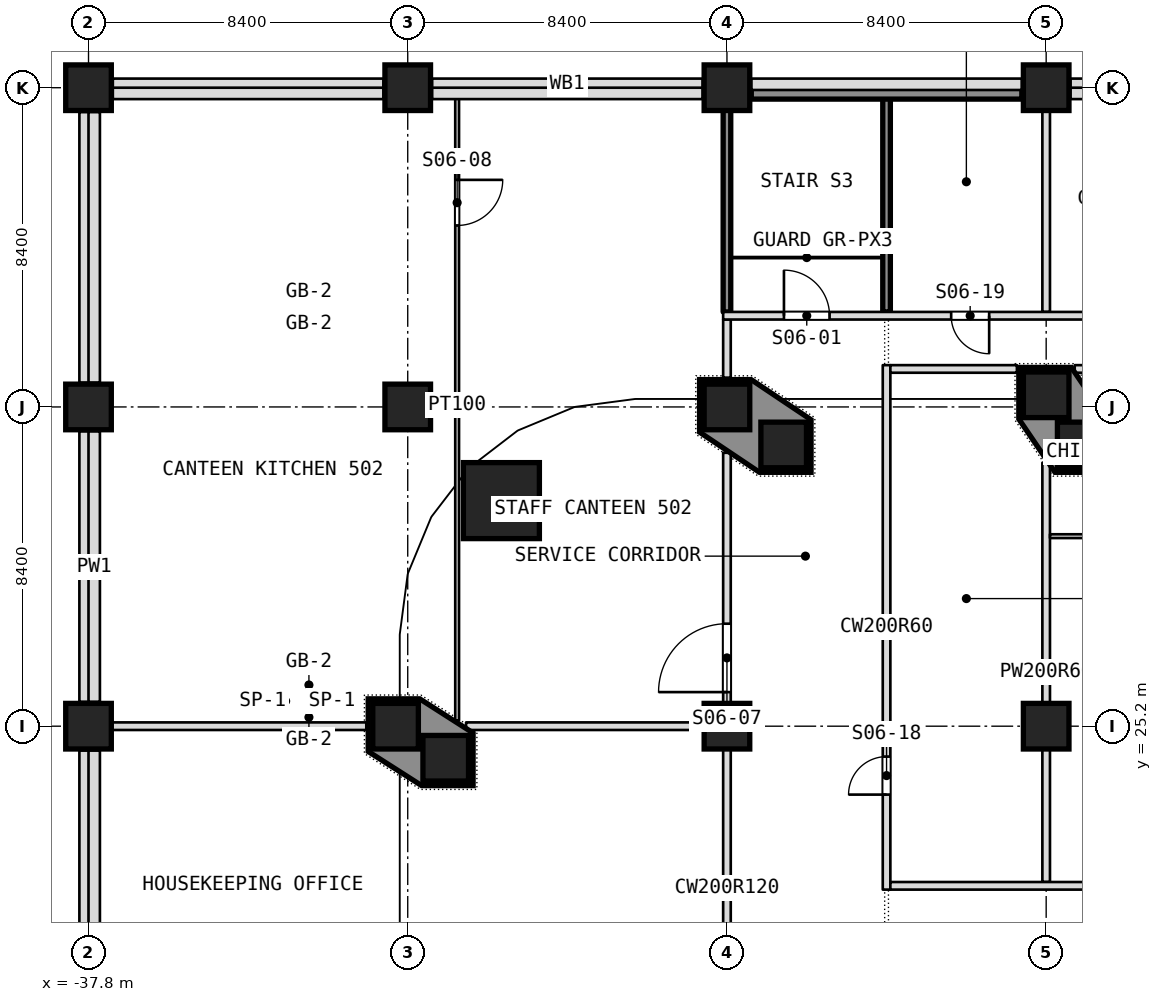
"""IFC4 building model, lengths in metres.
Left out: names, types, materials, properties, quantities, classifications, styles, units other than length and angle.
Written with IfcOpenShell. Run it as: python <this file> out.ifc"""

import sys

from ifc_helpers import new_model, si_unit, direction, frame, frame_2d, origin, origin_2d, place, context, subcontext, project, spatial, polyline, rectangle, outline, extrude, element, fill, save


model = new_model("IFC4")
c1 = context("Model", 3, precision=1e-05, world=origin(), true_north=direction((0.0, 1.0)))
c2 = subcontext(c1, "Body", "Model", "MODEL_VIEW")
j1 = project(units=[si_unit("LENGTHUNIT", "METRE"), si_unit("PLANEANGLEUNIT", "RADIAN")], contexts=[c1])
p1 = place(None, origin())
s1 = spatial("IfcSite", under=j1, at=p1, CompositionType="ELEMENT")
p2 = place(p1, origin())
s2 = spatial("IfcBuilding", under=s1, at=p2, CompositionType="ELEMENT")
p3 = place(p2, frame((0.0, 0.0, 31.0)))
s3 = spatial("IfcBuildingStorey", under=s2, at=p3, CompositionType="ELEMENT", Elevation=31.0)
for number, where, z_axis, x_axis in (
    (1, (-37.8, 25.2, 0.0), (0.0, 0.0, 1.0), (1.0, 0.0, 0.0)),
    (2, (-29.72, 25.2, 0.0), (0.0, 0.0, 1.0), (1.0, 0.0, 0.0)),
    (3, (-21.0, 25.2, 0.0), (0.0, 0.0, 1.0), (1.0, 0.0, 0.0)),
    (4, (-12.6, 25.2, 0.0), (0.0, 0.0, 1.0), (1.0, 0.0, 0.0)),
    (5, (-37.8, 33.6, 0.0), (0.0, 0.0, 1.0), (1.0, 0.0, 0.0)),
    (6, (-29.4, 33.6, 0.0), (0.0, 0.0, 1.0), (1.0, 0.0, 0.0)),
    (7, (-21.0, 33.6, 0.0), (0.0, 0.0, 1.0), (1.0, 0.0, 0.0)),
    (8, (-12.6, 33.92, 0.0), (0.0, 0.0, 1.0), (1.0, 0.0, 0.0)),
    (9, (-37.8, 42.0, 0.0), (0.0, 0.0, 1.0), (1.0, 0.0, 0.0)),
    (10, (-29.4, 42.0, 0.0), (0.0, 0.0, 1.0), (1.0, 0.0, 0.0)),
    (11, (-21.0, 42.0, 0.0), (0.0, 0.0, 1.0), (1.0, 0.0, 0.0)),
    (12, (-12.6, 42.0, 0.0), (0.0, 0.0, 1.0), (1.0, 0.0, 0.0)),
):
    element("IfcColumn", number, at=place(p3, frame(where, z_axis=z_axis, x_axis=x_axis)), inside=s3, PredefinedType="COLUMN", context=c2, shape_type="SweptSolid", body=[
        extrude(rectangle(XDim=1.2, YDim=1.2, at=origin_2d()), origin(), (0.0, 0.0, 1.0), 5.5),
    ])
p4 = place(p3, frame((-26.936, 31.135, 0.0), z_axis=(0.0, 0.0, 1.0), x_axis=(1.0, 0.0, 0.0)))
e13 = element("IfcColumn", 13, at=p4, inside=s3, PredefinedType="COLUMN", context=c2, shape_type="SweptSolid", body=[
    extrude(rectangle(XDim=2.0, YDim=2.0, at=origin_2d()), origin(), (0.0, 0.0, 1.0), 5.5),
])
for number, where, z_axis, x_axis in (
    (14, (-28.4, 24.356, 0.0), (0.0, 0.0, 1.0), (1.0, 0.0, 0.0)),
    (15, (-19.507, 32.6, 0.0), (0.0, 0.0, 1.0), (1.0, 0.0, 0.0)),
    (16, (-11.704, 32.6, 0.0), (0.0, 0.0, 1.0), (1.0, 0.0, 0.0)),
):
    element("IfcColumn", number, at=place(p3, frame(where, z_axis=z_axis, x_axis=x_axis)), inside=s3, PredefinedType="COLUMN", context=c2, shape_type="SweptSolid", body=[
        extrude(rectangle(XDim=1.2, YDim=1.2, at=origin_2d()), origin(), (0.0, 0.0, 1.0), 5.5),
    ])
p5 = place(p3, frame((-12.6, 21.1, 0.0), z_axis=(0.0, 0.0, 1.0), x_axis=(0.0, 1.0, 0.0)))
e17 = element("IfcWall", 17, at=p5, inside=s3, PredefinedType="PARTITIONING", context=c2, shape_type="SweptSolid", body=[
    extrude(rectangle(XDim=11.033, YDim=0.2, at=frame_2d((5.517, 0.0))), origin(), (0.0, 0.0, 1.0), 4.95),
])
p6 = place(p3, frame((-12.6, 36.1, 0.0), z_axis=(0.0, 0.0, 1.0), x_axis=(0.0, 1.0, 0.0)))
e18 = element("IfcWall", 18, at=p6, inside=s3, PredefinedType="PARTITIONING", context=c2, shape_type="SweptSolid", body=[
    extrude(rectangle(XDim=6.2, YDim=0.2, at=frame_2d((3.1, 0.0))), origin(), (0.0, 0.0, 1.0), 5.35),
])
p7 = place(p3, frame((-16.8, 20.9, 0.0), z_axis=(0.0, 0.0, 1.0), x_axis=(0.0, 1.0, 0.0)))
e19 = element("IfcWall", 19, at=p7, inside=s3, PredefinedType="PARTITIONING", context=c2, shape_type="SweptSolid", body=[
    extrude(rectangle(XDim=13.8, YDim=0.2, at=frame_2d((6.9, 0.0))), origin(), (0.0, 0.0, 1.0), 4.95),
])
p8 = place(p7, frame((2.5, 0.0, 0.0)))
e20 = element("IfcOpeningElement", 20, at=p8, cuts=e19, PredefinedType="OPENING", context=c2, shape_type="SweptSolid", body=[
    extrude(rectangle(XDim=1.0, YDim=2.1, at=frame_2d((0.5, 1.05))), frame((0.0, 0.1, 0.0), z_axis=(0.0, -1.0, 0.0), x_axis=(1.0, 0.0, 0.0)), (0.0, 0.0, 1.0), 0.2),
])
p9 = place(p3, frame((-16.8, 36.1, 0.0), z_axis=(0.0, 0.0, 1.0), x_axis=(0.0, 1.0, 0.0)))
e21 = element("IfcWall", 21, at=p9, inside=s3, PredefinedType="PARTITIONING", context=c2, shape_type="SweptSolid", body=[
    extrude(rectangle(XDim=5.84, YDim=0.2, at=frame_2d((2.92, 0.0))), origin(), (0.0, 0.0, 1.0), 5.35),
])
p10 = place(p3, frame((-21.0, 9.5, 0.0), z_axis=(0.0, 0.0, 1.0), x_axis=(0.0, 1.0, 0.0)))
e22 = element("IfcWall", 22, at=p10, inside=s3, PredefinedType="PARTITIONING", context=c2, shape_type="SweptSolid", body=[
    extrude(rectangle(XDim=22.894, YDim=0.2, at=frame_2d((11.447, 0.0))), origin(), (0.0, 0.0, 1.0), 4.95),
])
p11 = place(p10, frame((8.2, 0.0, 0.0)))
e23 = element("IfcOpeningElement", 23, at=p11, cuts=e22, PredefinedType="OPENING", context=c2, shape_type="SweptSolid", body=[
    extrude(rectangle(XDim=1.0, YDim=2.1, at=frame_2d((0.5, 1.05))), frame((0.0, 0.1, 0.0), z_axis=(0.0, -1.0, 0.0), x_axis=(1.0, 0.0, 0.0)), (0.0, 0.0, 1.0), 0.2),
])
p12 = place(p10, frame((16.597, 0.0, 0.0)))
e24 = element("IfcOpeningElement", 24, at=p12, cuts=e22, PredefinedType="OPENING", context=c2, shape_type="SweptSolid", body=[
    extrude(rectangle(XDim=1.8, YDim=2.1, at=frame_2d((0.9, 1.05))), frame((0.0, 0.1, 0.0), z_axis=(0.0, -1.0, 0.0), x_axis=(1.0, 0.0, 0.0)), (0.0, 0.0, 1.0), 0.2),
])
p13 = place(p3, frame((-21.0, 34.37, 0.0), z_axis=(0.0, 0.0, 1.0), x_axis=(0.0, 1.0, 0.0)))
e25 = element("IfcWall", 25, at=p13, inside=s3, PredefinedType="PARTITIONING", context=c2, shape_type="SweptSolid", body=[
    extrude(rectangle(XDim=1.53, YDim=0.2, at=frame_2d((0.765, 0.0))), origin(), (0.0, 0.0, 1.0), 5.35),
])
p14 = place(p3, frame((-21.0, 36.1, 0.0), z_axis=(0.0, 0.0, 1.0), x_axis=(0.0, 1.0, 0.0)))
e26 = element("IfcWall", 26, at=p14, inside=s3, PredefinedType="PARTITIONING", context=c2, shape_type="SweptSolid", body=[
    extrude(rectangle(XDim=6.2, YDim=0.2, at=frame_2d((3.1, 0.0))), origin(), (0.0, 0.0, 1.0), 5.35),
])
p15 = place(p3, frame((-16.7, 21.0, 0.0), z_axis=(0.0, 0.0, 1.0), x_axis=(1.0, 0.0, 0.0)))
e27 = element("IfcWall", 27, at=p15, inside=s3, PredefinedType="PARTITIONING", context=c2, shape_type="SweptSolid", body=[
    extrude(rectangle(XDim=21.0, YDim=0.2, at=frame_2d((10.5, 0.0))), origin(), (0.0, 0.0, 1.0), 5.35),
])
p16 = place(p15, frame((11.6, 0.0, 0.0)))
e28 = element("IfcOpeningElement", 28, at=p16, cuts=e27, PredefinedType="OPENING", context=c2, shape_type="SweptSolid", body=[
    extrude(rectangle(XDim=1.8, YDim=2.1, at=frame_2d((0.9, 1.05))), frame((0.0, 0.1, 0.0), z_axis=(0.0, -1.0, 0.0), x_axis=(1.0, 0.0, 0.0)), (0.0, 0.0, 1.0), 0.2),
])
p17 = place(p3, frame((-38.1, 25.2, 0.0), z_axis=(0.0, 0.0, 1.0), x_axis=(1.0, 0.0, 0.0)))
e29 = element("IfcWall", 29, at=p17, inside=s3, PredefinedType="PARTITIONING", context=c2, shape_type="SweptSolid", body=[
    extrude(rectangle(XDim=7.61, YDim=0.2, at=frame_2d((3.805, 0.0))), origin(), (0.0, 0.0, 1.0), 5.35),
])
p18 = place(p3, frame((-27.865, 25.2, 0.0), z_axis=(0.0, 0.0, 1.0), x_axis=(1.0, 0.0, 0.0)))
e30 = element("IfcWall", 30, at=p18, inside=s3, PredefinedType="PARTITIONING", context=c2, shape_type="SweptSolid", body=[
    extrude(rectangle(XDim=6.765, YDim=0.2, at=frame_2d((3.382, 0.0))), origin(), (0.0, 0.0, 1.0), 4.85),
])
p19 = place(p3, frame((-28.1, 25.35, 0.0), z_axis=(0.0, 0.0, 1.0), x_axis=(0.0, 1.0, 0.0)))
e31 = element("IfcWall", 31, at=p19, inside=s3, PredefinedType="PARTITIONING", context=c2, shape_type="SweptSolid", body=[
    extrude(rectangle(XDim=16.59, YDim=0.1, at=frame_2d((8.295, 0.0))), origin(), (0.0, 0.0, 1.0), 4.95),
])
p20 = place(p19, frame((13.025, 0.0, 0.0)))
e32 = element("IfcOpeningElement", 32, at=p20, cuts=e31, PredefinedType="OPENING", context=c2, shape_type="SweptSolid", body=[
    extrude(rectangle(XDim=1.2, YDim=2.1, at=frame_2d((0.6, 1.05))), frame((0.0, 0.05, 0.0), z_axis=(0.0, -1.0, 0.0), x_axis=(1.0, 0.0, 0.0)), (0.0, 0.0, 1.0), 0.1),
])
p21 = place(p3, frame((-12.5, 30.2, 0.0), z_axis=(0.0, 0.0, 1.0), x_axis=(1.0, 0.0, 0.0)))
e33 = element("IfcWall", 33, at=p21, inside=s3, PredefinedType="PARTITIONING", context=c2, shape_type="SweptSolid", body=[
    extrude(rectangle(XDim=16.8, YDim=0.1, at=frame_2d((8.4, 0.0))), origin(), (0.0, 0.0, 1.0), 5.35),
])
p22 = place(p21, frame((7.8, 0.0, 0.0)))
e34 = element("IfcOpeningElement", 34, at=p22, cuts=e33, PredefinedType="OPENING", context=c2, shape_type="SweptSolid", body=[
    extrude(rectangle(XDim=1.0, YDim=2.1, at=frame_2d((0.5, 1.05))), frame((0.0, 0.05, 0.0), z_axis=(0.0, -1.0, 0.0), x_axis=(1.0, 0.0, 0.0)), (0.0, 0.0, 1.0), 0.1),
])
p23 = place(p3, frame((-16.7, 34.6, 0.0), z_axis=(0.0, 0.0, 1.0), x_axis=(1.0, 0.0, 0.0)))
e35 = element("IfcWall", 35, at=p23, inside=s3, PredefinedType="PARTITIONING", context=c2, shape_type="SweptSolid", body=[
    extrude(rectangle(XDim=3.33, YDim=0.2, at=frame_2d((1.665, 0.0))), origin(), (0.0, 0.0, 1.0), 5.35),
])
p24 = place(p3, frame((-11.849, 34.6, 0.0), z_axis=(0.0, 0.0, 1.0), x_axis=(1.0, 0.0, 0.0)))
e36 = element("IfcWall", 36, at=p24, inside=s3, PredefinedType="PARTITIONING", context=c2, shape_type="SweptSolid", body=[
    extrude(rectangle(XDim=6.879, YDim=0.2, at=frame_2d((3.439, 0.0))), origin(), (0.0, 0.0, 1.0), 5.35),
])
p25 = place(p3, frame((-21.1, 36.0, 0.0), z_axis=(0.0, 0.0, 1.0), x_axis=(1.0, 0.0, 0.0)))
e37 = element("IfcWall", 37, at=p25, inside=s3, PredefinedType="PARTITIONING", context=c2, shape_type="SweptSolid", body=[
    extrude(rectangle(XDim=23.3, YDim=0.2, at=frame_2d((11.65, 0.0))), origin(), (0.0, 0.0, 1.0), 5.35),
])
p26 = place(p25, frame((1.6, 0.0, 0.0)))
e38 = element("IfcOpeningElement", 38, at=p26, cuts=e37, PredefinedType="OPENING", context=c2, shape_type="SweptSolid", body=[
    extrude(rectangle(XDim=1.2, YDim=2.1, at=frame_2d((0.6, 1.05))), frame((0.0, 0.1, 0.0), z_axis=(0.0, -1.0, 0.0), x_axis=(1.0, 0.0, 0.0)), (0.0, 0.0, 1.0), 0.2),
])
p27 = place(p25, frame((6.0, 0.0, 0.0)))
e39 = element("IfcOpeningElement", 39, at=p27, cuts=e37, PredefinedType="OPENING", context=c2, shape_type="SweptSolid", body=[
    extrude(rectangle(XDim=1.0, YDim=2.1, at=frame_2d((0.5, 1.05))), frame((0.0, 0.1, 0.0), z_axis=(0.0, -1.0, 0.0), x_axis=(1.0, 0.0, 0.0)), (0.0, 0.0, 1.0), 0.2),
])
p28 = place(p25, frame((13.15, 0.0, 0.0)))
e40 = element("IfcOpeningElement", 40, at=p28, cuts=e37, PredefinedType="OPENING", context=c2, shape_type="SweptSolid", body=[
    extrude(rectangle(XDim=1.0, YDim=2.1, at=frame_2d((0.5, 1.05))), frame((0.0, 0.1, 0.0), z_axis=(0.0, -1.0, 0.0), x_axis=(1.0, 0.0, 0.0)), (0.0, 0.0, 1.0), 0.2),
])
p29 = place(p25, frame((20.5, 0.0, 0.0)))
e41 = element("IfcOpeningElement", 41, at=p29, cuts=e37, PredefinedType="OPENING", context=c2, shape_type="SweptSolid", body=[
    extrude(rectangle(XDim=1.2, YDim=2.1, at=frame_2d((0.6, 1.05))), frame((0.0, 0.1, 0.0), z_axis=(0.0, -1.0, 0.0), x_axis=(1.0, 0.0, 0.0)), (0.0, 0.0, 1.0), 0.2),
])
p30 = place(p3, frame((-4.84, 42.09, 0.0), z_axis=(0.0, 0.0, 1.0), x_axis=(-1.0, 0.0, 0.0)))
e42 = element("IfcWall", 42, at=p30, inside=s3, PredefinedType="NOTDEFINED", context=c2, shape_type="SweptSolid", body=[
    extrude(rectangle(XDim=7.12, YDim=0.3, at=frame_2d((3.56, 0.0))), origin(), (0.0, 0.0, 1.0), 4.18),
])
for number, where, z_axis, x_axis in (
    (43, (-13.24, 42.09, 0.0), (0.0, 0.0, 1.0), (-1.0, 0.0, 0.0)),
    (44, (-21.64, 42.09, 0.0), (0.0, 0.0, 1.0), (-1.0, 0.0, 0.0)),
):
    element("IfcWall", number, at=place(p3, frame(where, z_axis=z_axis, x_axis=x_axis)), inside=s3, PredefinedType="NOTDEFINED", context=c2, shape_type="SweptSolid", body=[
        extrude(rectangle(XDim=7.12, YDim=0.3, at=frame_2d((3.56, 0.0))), origin(), (0.0, 0.0, 1.0), 4.18),
    ])
p31 = place(p3, frame((-30.04, 42.09, 0.0), z_axis=(0.0, 0.0, 1.0), x_axis=(-1.0, 0.0, 0.0)))
e45 = element("IfcWall", 45, at=p31, inside=s3, PredefinedType="NOTDEFINED", context=c2, shape_type="SweptSolid", body=[
    extrude(rectangle(XDim=7.12, YDim=0.3, at=frame_2d((3.56, 0.0))), origin(), (0.0, 0.0, 1.0), 4.18),
])
p32 = place(p3, frame((-37.89, 41.36, 0.0), z_axis=(0.0, 0.0, 1.0), x_axis=(0.0, -1.0, 0.0)))
e46 = element("IfcWall", 46, at=p32, inside=s3, PredefinedType="NOTDEFINED", context=c2, shape_type="SweptSolid", body=[
    extrude(rectangle(XDim=7.12, YDim=0.3, at=frame_2d((3.56, 0.0))), origin(), (0.0, 0.0, 1.0), 4.18),
])
p33 = place(p3, frame((-37.89, 32.96, 0.0), z_axis=(0.0, 0.0, 1.0), x_axis=(0.0, -1.0, 0.0)))
e47 = element("IfcWall", 47, at=p33, inside=s3, PredefinedType="NOTDEFINED", context=c2, shape_type="SweptSolid", body=[
    extrude(rectangle(XDim=7.12, YDim=0.3, at=frame_2d((3.56, 0.0))), origin(), (0.0, 0.0, 1.0), 4.18),
])
p34 = place(p3, frame((-37.89, 24.56, 0.0), z_axis=(0.0, 0.0, 1.0), x_axis=(0.0, -1.0, 0.0)))
e48 = element("IfcWall", 48, at=p34, inside=s3, PredefinedType="NOTDEFINED", context=c2, shape_type="SweptSolid", body=[
    extrude(rectangle(XDim=7.12, YDim=0.3, at=frame_2d((3.56, 0.0))), origin(), (0.0, 0.0, 1.0), 4.18),
])
p35 = place(p3, frame((-37.65, 17.44, 5.5), z_axis=(0.0, 0.0, 1.0), x_axis=(0.0, 1.0, 0.0)))
e49 = element("IfcWall", 49, at=p35, inside=s3, PredefinedType="PARAPET", context=c2, shape_type="SweptSolid", body=[
    extrude(rectangle(XDim=7.12, YDim=0.3, at=frame_2d((3.56, 0.0))), origin(), (0.0, 0.0, 1.0), 1.1),
])
p36 = place(p3, frame((-37.65, 25.84, 5.5), z_axis=(0.0, 0.0, 1.0), x_axis=(0.0, 1.0, 0.0)))
e50 = element("IfcWall", 50, at=p36, inside=s3, PredefinedType="PARAPET", context=c2, shape_type="SweptSolid", body=[
    extrude(rectangle(XDim=7.12, YDim=0.3, at=frame_2d((3.56, 0.0))), origin(), (0.0, 0.0, 1.0), 1.1),
])
p37 = place(p3, frame((-37.65, 34.24, 5.5), z_axis=(0.0, 0.0, 1.0), x_axis=(0.0, 1.0, 0.0)))
e51 = element("IfcWall", 51, at=p37, inside=s3, PredefinedType="PARAPET", context=c2, shape_type="SweptSolid", body=[
    extrude(rectangle(XDim=7.12, YDim=0.3, at=frame_2d((3.56, 0.0))), origin(), (0.0, 0.0, 1.0), 1.1),
])
p38 = place(p3, frame((-37.16, 41.85, 5.5), z_axis=(0.0, 0.0, 1.0), x_axis=(1.0, 0.0, 0.0)))
e52 = element("IfcWall", 52, at=p38, inside=s3, PredefinedType="PARAPET", context=c2, shape_type="SweptSolid", body=[
    extrude(rectangle(XDim=7.12, YDim=0.3, at=frame_2d((3.56, 0.0))), origin(), (0.0, 0.0, 1.0), 1.1),
])
for number, where, z_axis, x_axis in (
    (53, (-28.76, 41.85, 5.5), (0.0, 0.0, 1.0), (1.0, 0.0, 0.0)),
    (54, (-20.36, 41.85, 5.5), (0.0, 0.0, 1.0), (1.0, 0.0, 0.0)),
):
    element("IfcWall", number, at=place(p3, frame(where, z_axis=z_axis, x_axis=x_axis)), inside=s3, PredefinedType="PARAPET", context=c2, shape_type="SweptSolid", body=[
        extrude(rectangle(XDim=7.12, YDim=0.3, at=frame_2d((3.56, 0.0))), origin(), (0.0, 0.0, 1.0), 1.1),
    ])
p39 = place(p3, frame((-11.96, 41.85, 5.5), z_axis=(0.0, 0.0, 1.0), x_axis=(1.0, 0.0, 0.0)))
e55 = element("IfcWall", 55, at=p39, inside=s3, PredefinedType="PARAPET", context=c2, shape_type="SweptSolid", body=[
    extrude(rectangle(XDim=7.12, YDim=0.3, at=frame_2d((3.56, 0.0))), origin(), (0.0, 0.0, 1.0), 1.1),
])
p40 = place(p3, origin())
e56 = element("IfcWall", 56, at=p40, inside=s3, PredefinedType="SOLIDWALL", context=c2, shape_type="SweptSolid", body=[
    extrude(outline(polyline([(-30.44, 24.534), (-30.44, 25.92), (-29.085, 25.92), (-27.68, 25.022), (-27.68, 23.636), (-29.035, 23.636), (-30.44, 24.534)]), holes=[polyline([(-29.0, 23.756), (-27.8, 23.756), (-27.8, 24.956), (-29.0, 24.956), (-29.0, 23.756)]), polyline([(-30.32, 24.6), (-29.12, 24.6), (-29.12, 25.8), (-30.32, 25.8), (-30.32, 24.6)])]), origin(), (0.0, 0.0, 1.0), 5.5),
])
p41 = place(p3, origin())
e57 = element("IfcWall", 57, at=p41, inside=s3, PredefinedType="SOLIDWALL", context=c2, shape_type="SweptSolid", body=[
    extrude(outline(polyline([(-21.72, 34.32), (-20.364, 34.32), (-18.787, 33.264), (-18.787, 31.88), (-20.143, 31.88), (-21.72, 32.936), (-21.72, 34.32)]), holes=[polyline([(-18.907, 32.0), (-18.907, 33.2), (-20.107, 33.2), (-20.107, 32.0), (-18.907, 32.0)]), polyline([(-20.4, 33.0), (-20.4, 34.2), (-21.6, 34.2), (-21.6, 33.0), (-20.4, 33.0)])]), origin(), (0.0, 0.0, 1.0), 5.5),
])
p42 = place(p3, origin())
e58 = element("IfcWall", 58, at=p42, inside=s3, PredefinedType="SOLIDWALL", context=c2, shape_type="SweptSolid", body=[
    extrude(outline(polyline([(-13.32, 34.64), (-11.937, 34.64), (-10.984, 33.237), (-10.984, 31.88), (-12.368, 31.88), (-13.32, 33.283), (-13.32, 34.64)]), holes=[polyline([(-11.104, 32.0), (-11.104, 33.2), (-12.304, 33.2), (-12.304, 32.0), (-11.104, 32.0)]), polyline([(-12.0, 33.32), (-12.0, 34.52), (-13.2, 34.52), (-13.2, 33.32), (-12.0, 33.32)])]), origin(), (0.0, 0.0, 1.0), 5.5),
])
p43 = place(p26, origin())
e59 = element("IfcDoor", 59, at=p43, inside=s3, OperationType="SINGLE_SWING_RIGHT", PredefinedType="DOOR", context=c2, shape_type="SweptSolid", body=[
    extrude(rectangle(XDim=1.2, YDim=2.1, at=frame_2d((0.6, 1.05))), frame((0.0, 0.025, 0.0), z_axis=(0.0, -1.0, 0.0), x_axis=(1.0, 0.0, 0.0)), (0.0, 0.0, 1.0), 0.05),
])
fill(e38, e59)
p44 = place(p12, origin())
e60 = element("IfcDoor", 60, at=p44, inside=s3, OperationType="DOUBLE_DOOR_SINGLE_SWING", PredefinedType="DOOR", context=c2, shape_type="SweptSolid", body=[
    extrude(rectangle(XDim=1.8, YDim=2.1, at=frame_2d((0.9, 1.05))), frame((0.0, 0.025, 0.0), z_axis=(0.0, -1.0, 0.0), x_axis=(1.0, 0.0, 0.0)), (0.0, 0.0, 1.0), 0.05),
])
fill(e24, e60)
p45 = place(p20, origin())
e61 = element("IfcDoor", 61, at=p45, inside=s3, OperationType="SINGLE_SWING_RIGHT", PredefinedType="DOOR", context=c2, shape_type="SweptSolid", body=[
    extrude(rectangle(XDim=1.2, YDim=2.1, at=frame_2d((0.6, 1.05))), frame((0.0, 0.025, 0.0), z_axis=(0.0, -1.0, 0.0), x_axis=(1.0, 0.0, 0.0)), (0.0, 0.0, 1.0), 0.05),
])
fill(e32, e61)
p46 = place(p8, origin())
e62 = element("IfcDoor", 62, at=p46, inside=s3, OperationType="SINGLE_SWING_LEFT", PredefinedType="DOOR", context=c2, shape_type="SweptSolid", body=[
    extrude(rectangle(XDim=1.0, YDim=2.1, at=frame_2d((0.5, 1.05))), frame((0.0, 0.025, 0.0), z_axis=(0.0, -1.0, 0.0), x_axis=(1.0, 0.0, 0.0)), (0.0, 0.0, 1.0), 0.05),
])
fill(e20, e62)
p47 = place(p27, origin())
e63 = element("IfcDoor", 63, at=p47, inside=s3, OperationType="SINGLE_SWING_LEFT", PredefinedType="DOOR", context=c2, shape_type="SweptSolid", body=[
    extrude(rectangle(XDim=1.0, YDim=2.1, at=frame_2d((0.5, 1.05))), frame((0.0, 0.025, 0.0), z_axis=(0.0, -1.0, 0.0), x_axis=(1.0, 0.0, 0.0)), (0.0, 0.0, 1.0), 0.05),
])
fill(e39, e63)
save(model, sys.argv[1])
